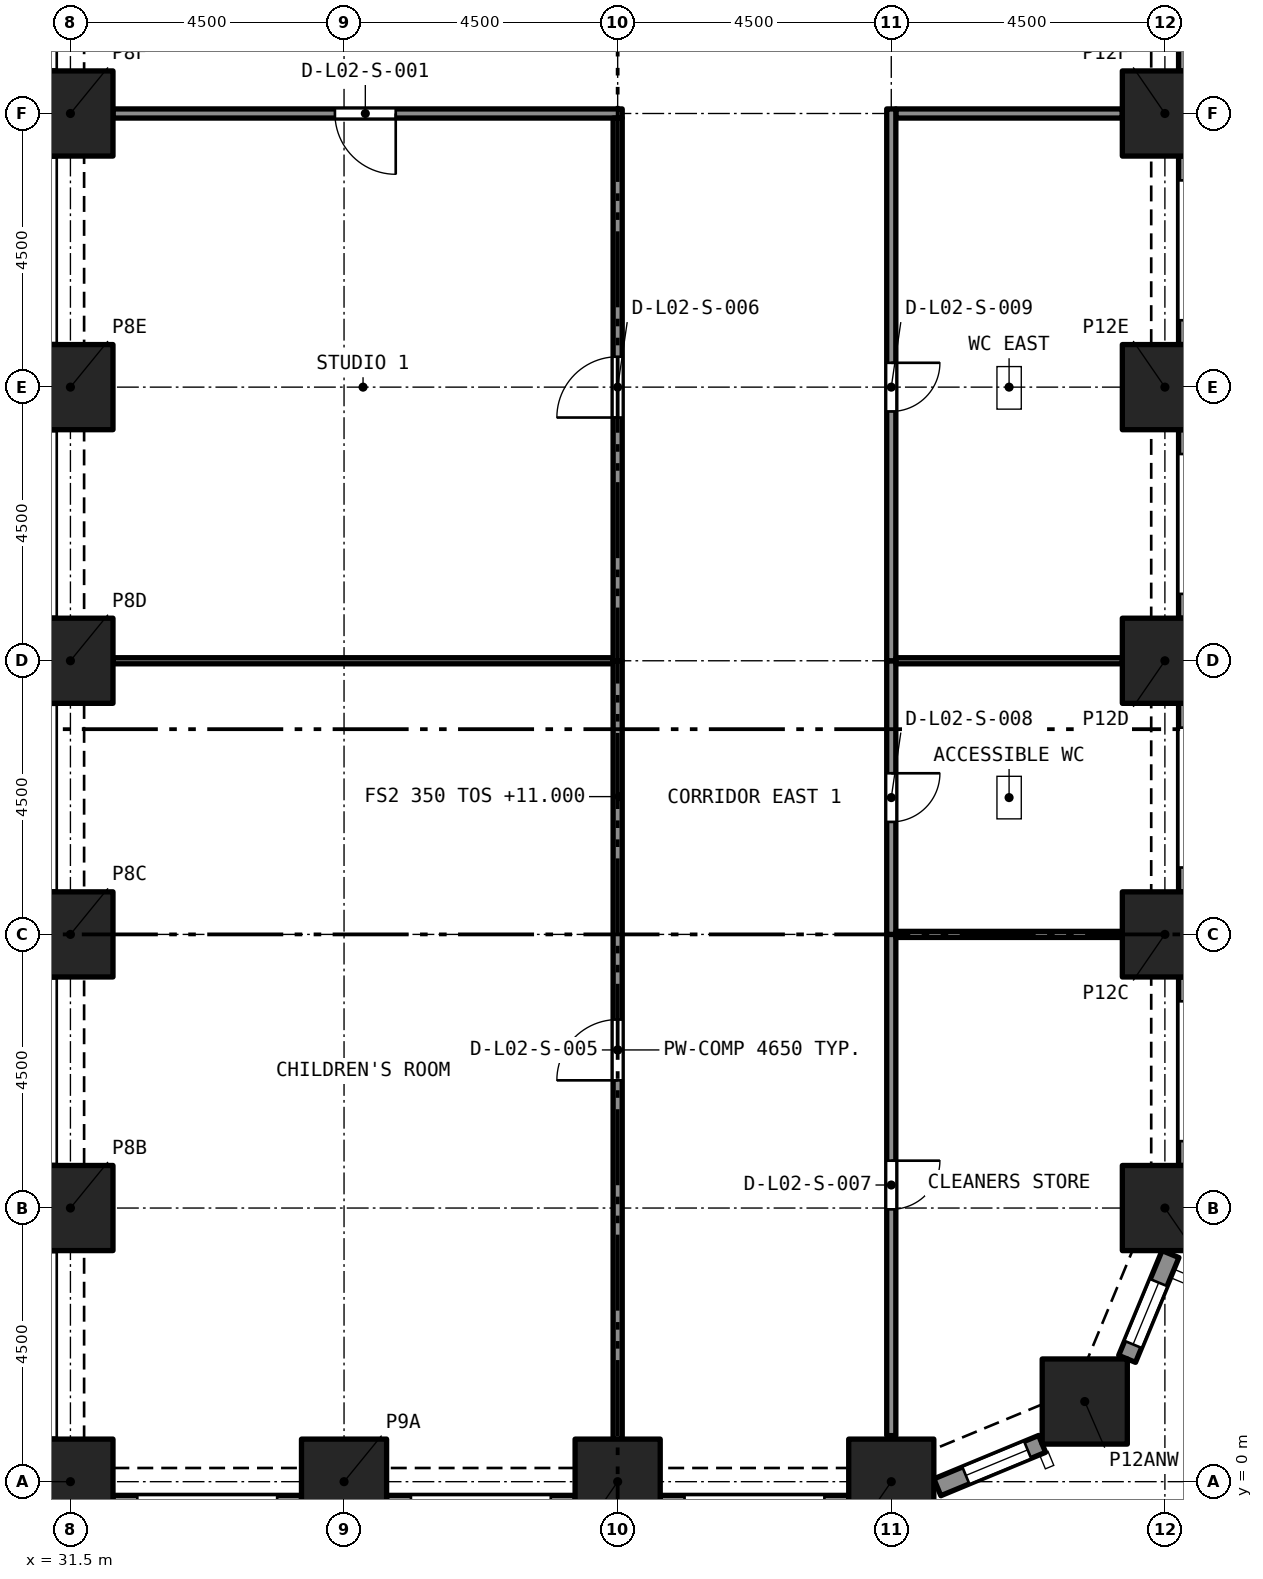
"""IFC4 building model, lengths in metres.
Left out: names, types, materials, properties, quantities, classifications, styles, units other than length and angle.
Written with IfcOpenShell. Run it as: python <this file> out.ifc"""

import sys

from ifc_helpers import new_model, si_unit, direction, frame, frame_2d, origin, origin_2d, place, context, subcontext, project, spatial, rectangle, extrude, element, fill, save


model = new_model("IFC4")
c1 = context("Model", 3, precision=1e-05, world=origin(), true_north=direction((0.0, 1.0)))
c2 = subcontext(c1, "Body", "Model", "MODEL_VIEW")
j1 = project(units=[si_unit("LENGTHUNIT", "METRE"), si_unit("PLANEANGLEUNIT", "RADIAN")], contexts=[c1])
p1 = place(None, origin())
s1 = spatial("IfcSite", under=j1, at=p1, CompositionType="ELEMENT")
p2 = place(p1, origin())
s2 = spatial("IfcBuilding", under=s1, at=p2, CompositionType="ELEMENT")
p3 = place(p2, frame((0.0, 0.0, 11.0)))
s3 = spatial("IfcBuildingStorey", under=s2, at=p3, CompositionType="ELEMENT", Elevation=11.0)
for number, where, z_axis, x_axis in (
    (1, (31.5, 0.0, 0.0), (0.0, 0.0, 1.0), (1.0, 0.0, 0.0)),
    (2, (36.0, 0.0, 0.0), (0.0, 0.0, 1.0), (1.0, 0.0, 0.0)),
    (3, (40.5, 0.0, 0.0), (0.0, 0.0, 1.0), (1.0, 0.0, 0.0)),
    (4, (45.0, 0.0, 0.0), (0.0, 0.0, 1.0), (1.0, 0.0, 0.0)),
    (5, (48.182, 1.318, 0.0), (0.0, 0.0, 1.0), (1.0, 0.0, 0.0)),
    (6, (31.5, 4.5, 0.0), (0.0, 0.0, 1.0), (1.0, 0.0, 0.0)),
    (7, (49.5, 4.5, 0.0), (0.0, 0.0, 1.0), (1.0, 0.0, 0.0)),
    (8, (31.5, 9.0, 0.0), (0.0, 0.0, 1.0), (1.0, 0.0, 0.0)),
    (9, (49.5, 9.0, 0.0), (0.0, 0.0, 1.0), (1.0, 0.0, 0.0)),
    (10, (31.5, 13.5, 0.0), (0.0, 0.0, 1.0), (1.0, 0.0, 0.0)),
    (11, (49.5, 13.5, 0.0), (0.0, 0.0, 1.0), (1.0, 0.0, 0.0)),
    (12, (31.5, 18.0, 0.0), (0.0, 0.0, 1.0), (1.0, 0.0, 0.0)),
    (13, (49.5, 18.0, 0.0), (0.0, 0.0, 1.0), (1.0, 0.0, 0.0)),
    (14, (31.5, 22.5, 0.0), (0.0, 0.0, 1.0), (1.0, 0.0, 0.0)),
    (15, (49.5, 22.5, 0.0), (0.0, 0.0, 1.0), (1.0, 0.0, 0.0)),
):
    element("IfcColumn", number, at=place(p3, frame(where, z_axis=z_axis, x_axis=x_axis)), inside=s3, PredefinedType="COLUMN", context=c2, shape_type="SweptSolid", body=[
        extrude(rectangle(XDim=1.4, YDim=1.4, at=origin_2d()), origin(), (0.0, 0.0, 1.0), 5.0),
    ])
p4 = place(p3, frame((35.3, -0.375, 0.0), z_axis=(0.0, 0.0, 1.0), x_axis=(-1.0, 0.0, 0.0)))
e16 = element("IfcWall", 16, at=p4, inside=s3, PredefinedType="SOLIDWALL", context=c2, shape_type="SweptSolid", body=[
    extrude(rectangle(XDim=3.1, YDim=0.3, at=frame_2d((1.55, 0.0))), origin(), (0.0, 0.0, 1.0), 5.0),
])
p5 = place(p4, frame((0.4, 0.0, 0.45)))
e17 = element("IfcOpeningElement", 17, at=p5, cuts=e16, PredefinedType="OPENING", context=c2, shape_type="SweptSolid", body=[
    extrude(rectangle(XDim=2.3, YDim=3.3, at=frame_2d((1.15, 1.65))), frame((0.0, 0.16, 0.0), z_axis=(0.0, -1.0, 0.0), x_axis=(1.0, 0.0, 0.0)), (0.0, 0.0, 1.0), 0.32),
])
p6 = place(p3, frame((39.8, -0.375, 0.0), z_axis=(0.0, 0.0, 1.0), x_axis=(-1.0, 0.0, 0.0)))
e18 = element("IfcWall", 18, at=p6, inside=s3, PredefinedType="SOLIDWALL", context=c2, shape_type="SweptSolid", body=[
    extrude(rectangle(XDim=3.1, YDim=0.3, at=frame_2d((1.55, 0.0))), origin(), (0.0, 0.0, 1.0), 5.0),
])
p7 = place(p6, frame((0.4, 0.0, 0.45)))
e19 = element("IfcOpeningElement", 19, at=p7, cuts=e18, PredefinedType="OPENING", context=c2, shape_type="SweptSolid", body=[
    extrude(rectangle(XDim=2.3, YDim=3.3, at=frame_2d((1.15, 1.65))), frame((0.0, 0.16, 0.0), z_axis=(0.0, -1.0, 0.0), x_axis=(1.0, 0.0, 0.0)), (0.0, 0.0, 1.0), 0.32),
])
p8 = place(p3, frame((44.3, -0.375, 0.0), z_axis=(0.0, 0.0, 1.0), x_axis=(-1.0, 0.0, 0.0)))
e20 = element("IfcWall", 20, at=p8, inside=s3, PredefinedType="SOLIDWALL", context=c2, shape_type="SweptSolid", body=[
    extrude(rectangle(XDim=3.1, YDim=0.3, at=frame_2d((1.55, 0.0))), origin(), (0.0, 0.0, 1.0), 5.0),
])
p9 = place(p8, frame((0.4, 0.0, 0.45)))
e21 = element("IfcOpeningElement", 21, at=p9, cuts=e20, PredefinedType="OPENING", context=c2, shape_type="SweptSolid", body=[
    extrude(rectangle(XDim=2.3, YDim=3.3, at=frame_2d((1.15, 1.65))), frame((0.0, 0.16, 0.0), z_axis=(0.0, -1.0, 0.0), x_axis=(1.0, 0.0, 0.0)), (0.0, 0.0, 1.0), 0.32),
])
p10 = place(p3, frame((47.48, 0.622, 0.0), z_axis=(0.0, 0.0, 1.0), x_axis=(-0.923903565336, -0.38262540684, 0.0)))
e22 = element("IfcWall", 22, at=p10, inside=s3, PredefinedType="SOLIDWALL", context=c2, shape_type="SweptSolid", body=[
    extrude(rectangle(XDim=1.865, YDim=0.3, at=frame_2d((0.933, 0.0))), origin(), (0.0, 0.0, 1.0), 5.0),
])
p11 = place(p10, frame((0.258, 0.0, 0.45)))
e23 = element("IfcOpeningElement", 23, at=p11, cuts=e22, PredefinedType="OPENING", context=c2, shape_type="SweptSolid", body=[
    extrude(rectangle(XDim=1.1, YDim=3.3, at=frame_2d((0.55, 1.65))), frame((0.0, 0.16, 0.0), z_axis=(0.0, -1.0, 0.0), x_axis=(1.0, 0.0, 0.0)), (0.0, 0.0, 1.0), 0.32),
])
p12 = place(p3, frame((49.592, 3.743, 0.0), z_axis=(0.0, 0.0, 1.0), x_axis=(-0.382737135771, -0.923857286003, 0.0)))
e24 = element("IfcWall", 24, at=p12, inside=s3, PredefinedType="SOLIDWALL", context=c2, shape_type="SweptSolid", body=[
    extrude(rectangle(XDim=1.865, YDim=0.3, at=frame_2d((0.933, 0.0))), origin(), (0.0, 0.0, 1.0), 5.0),
])
p13 = place(p12, frame((0.508, 0.0, 0.45)))
e25 = element("IfcOpeningElement", 25, at=p13, cuts=e24, PredefinedType="OPENING", context=c2, shape_type="SweptSolid", body=[
    extrude(rectangle(XDim=1.1, YDim=3.3, at=frame_2d((0.55, 1.65))), frame((0.0, 0.16, 0.0), z_axis=(0.0, -1.0, 0.0), x_axis=(1.0, 0.0, 0.0)), (0.0, 0.0, 1.0), 0.32),
])
p14 = place(p3, frame((49.875, 8.3, 0.0), z_axis=(0.0, 0.0, 1.0), x_axis=(0.0, -1.0, 0.0)))
e26 = element("IfcWall", 26, at=p14, inside=s3, PredefinedType="SOLIDWALL", context=c2, shape_type="SweptSolid", body=[
    extrude(rectangle(XDim=3.1, YDim=0.3, at=frame_2d((1.55, 0.0))), origin(), (0.0, 0.0, 1.0), 5.0),
])
p15 = place(p14, frame((0.4, 0.0, 0.45)))
e27 = element("IfcOpeningElement", 27, at=p15, cuts=e26, PredefinedType="OPENING", context=c2, shape_type="SweptSolid", body=[
    extrude(rectangle(XDim=2.3, YDim=3.3, at=frame_2d((1.15, 1.65))), frame((0.0, 0.16, 0.0), z_axis=(0.0, -1.0, 0.0), x_axis=(1.0, 0.0, 0.0)), (0.0, 0.0, 1.0), 0.32),
])
p16 = place(p3, frame((49.875, 12.8, 0.0), z_axis=(0.0, 0.0, 1.0), x_axis=(0.0, -1.0, 0.0)))
e28 = element("IfcWall", 28, at=p16, inside=s3, PredefinedType="SOLIDWALL", context=c2, shape_type="SweptSolid", body=[
    extrude(rectangle(XDim=3.1, YDim=0.3, at=frame_2d((1.55, 0.0))), origin(), (0.0, 0.0, 1.0), 5.0),
])
p17 = place(p16, frame((0.4, 0.0, 0.45)))
e29 = element("IfcOpeningElement", 29, at=p17, cuts=e28, PredefinedType="OPENING", context=c2, shape_type="SweptSolid", body=[
    extrude(rectangle(XDim=2.3, YDim=3.3, at=frame_2d((1.15, 1.65))), frame((0.0, 0.16, 0.0), z_axis=(0.0, -1.0, 0.0), x_axis=(1.0, 0.0, 0.0)), (0.0, 0.0, 1.0), 0.32),
])
p18 = place(p3, frame((49.875, 17.3, 0.0), z_axis=(0.0, 0.0, 1.0), x_axis=(0.0, -1.0, 0.0)))
e30 = element("IfcWall", 30, at=p18, inside=s3, PredefinedType="SOLIDWALL", context=c2, shape_type="SweptSolid", body=[
    extrude(rectangle(XDim=3.1, YDim=0.3, at=frame_2d((1.55, 0.0))), origin(), (0.0, 0.0, 1.0), 5.0),
])
p19 = place(p18, frame((0.4, 0.0, 0.45)))
e31 = element("IfcOpeningElement", 31, at=p19, cuts=e30, PredefinedType="OPENING", context=c2, shape_type="SweptSolid", body=[
    extrude(rectangle(XDim=2.3, YDim=3.3, at=frame_2d((1.15, 1.65))), frame((0.0, 0.16, 0.0), z_axis=(0.0, -1.0, 0.0), x_axis=(1.0, 0.0, 0.0)), (0.0, 0.0, 1.0), 0.32),
])
p20 = place(p3, frame((49.875, 21.8, 0.0), z_axis=(0.0, 0.0, 1.0), x_axis=(0.0, -1.0, 0.0)))
e32 = element("IfcWall", 32, at=p20, inside=s3, PredefinedType="SOLIDWALL", context=c2, shape_type="SweptSolid", body=[
    extrude(rectangle(XDim=3.1, YDim=0.3, at=frame_2d((1.55, 0.0))), origin(), (0.0, 0.0, 1.0), 5.0),
])
p21 = place(p20, frame((0.4, 0.0, 0.45)))
e33 = element("IfcOpeningElement", 33, at=p21, cuts=e32, PredefinedType="OPENING", context=c2, shape_type="SweptSolid", body=[
    extrude(rectangle(XDim=2.3, YDim=3.3, at=frame_2d((1.15, 1.65))), frame((0.0, 0.16, 0.0), z_axis=(0.0, -1.0, 0.0), x_axis=(1.0, 0.0, 0.0)), (0.0, 0.0, 1.0), 0.32),
])
p22 = place(p3, frame((49.875, 26.3, 0.0), z_axis=(0.0, 0.0, 1.0), x_axis=(0.0, -1.0, 0.0)))
e34 = element("IfcWall", 34, at=p22, inside=s3, PredefinedType="SOLIDWALL", context=c2, shape_type="SweptSolid", body=[
    extrude(rectangle(XDim=3.1, YDim=0.3, at=frame_2d((1.55, 0.0))), origin(), (0.0, 0.0, 1.0), 5.0),
])
p23 = place(p22, frame((0.4, 0.0, 0.45)))
e35 = element("IfcOpeningElement", 35, at=p23, cuts=e34, PredefinedType="OPENING", context=c2, shape_type="SweptSolid", body=[
    extrude(rectangle(XDim=2.3, YDim=3.3, at=frame_2d((1.15, 1.65))), frame((0.0, 0.16, 0.0), z_axis=(0.0, -1.0, 0.0), x_axis=(1.0, 0.0, 0.0)), (0.0, 0.0, 1.0), 0.32),
])
p24 = place(p3, frame((40.575, 22.5, 0.0), z_axis=(0.0, 0.0, 1.0), x_axis=(-1.0, 0.0, 0.0)))
e36 = element("IfcWall", 36, at=p24, inside=s3, PredefinedType="PARTITIONING", context=c2, shape_type="SweptSolid", body=[
    extrude(rectangle(XDim=8.375, YDim=0.15, at=frame_2d((4.188, 0.0))), origin(), (0.0, 0.0, 1.0), 4.65),
])
p25 = place(p24, frame((3.725, 0.0, 0.0)))
e37 = element("IfcOpeningElement", 37, at=p25, cuts=e36, PredefinedType="OPENING", context=c2, shape_type="SweptSolid", body=[
    extrude(rectangle(XDim=1.0, YDim=2.1, at=frame_2d((0.5, 1.05))), frame((0.0, 0.085, 0.0), z_axis=(0.0, -1.0, 0.0), x_axis=(1.0, 0.0, 0.0)), (0.0, 0.0, 1.0), 0.17),
])
p26 = place(p3, frame((45.075, 22.5, 0.0), z_axis=(0.0, 0.0, 1.0), x_axis=(1.0, 0.0, 0.0)))
e38 = element("IfcWall", 38, at=p26, inside=s3, PredefinedType="PARTITIONING", context=c2, shape_type="SweptSolid", body=[
    extrude(rectangle(XDim=3.725, YDim=0.15, at=frame_2d((1.863, 0.0))), origin(), (0.0, 0.0, 1.0), 4.65),
])
p27 = place(p3, frame((32.2, 13.5, 0.0), z_axis=(0.0, 0.0, 1.0), x_axis=(1.0, 0.0, 0.0)))
e39 = element("IfcWall", 39, at=p27, inside=s3, PredefinedType="PARTITIONING", context=c2, shape_type="SweptSolid", body=[
    extrude(rectangle(XDim=8.225, YDim=0.1, at=frame_2d((4.113, 0.0))), origin(), (0.0, 0.0, 1.0), 4.65),
])
p28 = place(p3, frame((40.5, 0.7, 0.0), z_axis=(0.0, 0.0, 1.0), x_axis=(0.0, 1.0, 0.0)))
e40 = element("IfcWall", 40, at=p28, inside=s3, PredefinedType="PARTITIONING", context=c2, shape_type="SweptSolid", body=[
    extrude(rectangle(XDim=12.8, YDim=0.15, at=frame_2d((6.4, 0.0))), origin(), (0.0, 0.0, 1.0), 4.65),
])
p29 = place(p28, frame((5.9, 0.0, 0.0)))
e41 = element("IfcOpeningElement", 41, at=p29, cuts=e40, PredefinedType="OPENING", context=c2, shape_type="SweptSolid", body=[
    extrude(rectangle(XDim=1.0, YDim=2.1, at=frame_2d((0.5, 1.05))), frame((0.0, 0.085, 0.0), z_axis=(0.0, -1.0, 0.0), x_axis=(1.0, 0.0, 0.0)), (0.0, 0.0, 1.0), 0.17),
])
p30 = place(p3, frame((40.5, 13.5, 0.0), z_axis=(0.0, 0.0, 1.0), x_axis=(0.0, 1.0, 0.0)))
e42 = element("IfcWall", 42, at=p30, inside=s3, PredefinedType="PARTITIONING", context=c2, shape_type="SweptSolid", body=[
    extrude(rectangle(XDim=8.925, YDim=0.15, at=frame_2d((4.462, 0.0))), origin(), (0.0, 0.0, 1.0), 4.65),
])
p31 = place(p30, frame((4.0, 0.0, 0.0)))
e43 = element("IfcOpeningElement", 43, at=p31, cuts=e42, PredefinedType="OPENING", context=c2, shape_type="SweptSolid", body=[
    extrude(rectangle(XDim=1.0, YDim=2.1, at=frame_2d((0.5, 1.05))), frame((0.0, 0.085, 0.0), z_axis=(0.0, -1.0, 0.0), x_axis=(1.0, 0.0, 0.0)), (0.0, 0.0, 1.0), 0.17),
])
p32 = place(p3, frame((45.0, 9.0, 0.0), z_axis=(0.0, 0.0, 1.0), x_axis=(0.0, -1.0, 0.0)))
e44 = element("IfcWall", 44, at=p32, inside=s3, PredefinedType="PARTITIONING", context=c2, shape_type="SweptSolid", body=[
    extrude(rectangle(XDim=8.242, YDim=0.15, at=frame_2d((4.121, 0.0))), origin(), (0.0, 0.0, 1.0), 4.65),
])
p33 = place(p32, frame((3.721, 0.0, 0.0)))
e45 = element("IfcOpeningElement", 45, at=p33, cuts=e44, PredefinedType="OPENING", context=c2, shape_type="SweptSolid", body=[
    extrude(rectangle(XDim=0.8, YDim=2.1, at=frame_2d((0.4, 1.05))), frame((0.0, 0.085, 0.0), z_axis=(0.0, -1.0, 0.0), x_axis=(1.0, 0.0, 0.0)), (0.0, 0.0, 1.0), 0.17),
])
p34 = place(p3, frame((45.0, 13.5, 0.0), z_axis=(0.0, 0.0, 1.0), x_axis=(0.0, -1.0, 0.0)))
e46 = element("IfcWall", 46, at=p34, inside=s3, PredefinedType="PARTITIONING", context=c2, shape_type="SweptSolid", body=[
    extrude(rectangle(XDim=4.5, YDim=0.15, at=frame_2d((2.25, 0.0))), origin(), (0.0, 0.0, 1.0), 4.65),
])
p35 = place(p34, frame((1.85, 0.0, 0.0)))
e47 = element("IfcOpeningElement", 47, at=p35, cuts=e46, PredefinedType="OPENING", context=c2, shape_type="SweptSolid", body=[
    extrude(rectangle(XDim=0.8, YDim=2.1, at=frame_2d((0.4, 1.05))), frame((0.0, 0.085, 0.0), z_axis=(0.0, -1.0, 0.0), x_axis=(1.0, 0.0, 0.0)), (0.0, 0.0, 1.0), 0.17),
])
p36 = place(p3, frame((45.0, 22.575, 0.0), z_axis=(0.0, 0.0, 1.0), x_axis=(0.0, -1.0, 0.0)))
e48 = element("IfcWall", 48, at=p36, inside=s3, PredefinedType="PARTITIONING", context=c2, shape_type="SweptSolid", body=[
    extrude(rectangle(XDim=9.075, YDim=0.15, at=frame_2d((4.538, 0.0))), origin(), (0.0, 0.0, 1.0), 4.65),
])
p37 = place(p36, frame((4.175, 0.0, 0.0)))
e49 = element("IfcOpeningElement", 49, at=p37, cuts=e48, PredefinedType="OPENING", context=c2, shape_type="SweptSolid", body=[
    extrude(rectangle(XDim=0.8, YDim=2.1, at=frame_2d((0.4, 1.05))), frame((0.0, 0.085, 0.0), z_axis=(0.0, -1.0, 0.0), x_axis=(1.0, 0.0, 0.0)), (0.0, 0.0, 1.0), 0.17),
])
for number, where, z_axis, x_axis in (
    (50, (45.075, 9.0, 0.0), (0.0, 0.0, 1.0), (1.0, 0.0, 0.0)),
    (51, (45.075, 13.5, 0.0), (0.0, 0.0, 1.0), (1.0, 0.0, 0.0)),
):
    element("IfcWall", number, at=place(p3, frame(where, z_axis=z_axis, x_axis=x_axis)), inside=s3, PredefinedType="PARTITIONING", context=c2, shape_type="SweptSolid", body=[
        extrude(rectangle(XDim=3.725, YDim=0.1, at=frame_2d((1.863, 0.0))), origin(), (0.0, 0.0, 1.0), 4.65),
    ])
p38 = place(p11, origin())
e52 = element("IfcWindow", 52, at=p38, inside=s3, PartitioningType="SINGLE_PANEL", PredefinedType="WINDOW", context=c2, shape_type="SweptSolid", body=[
    extrude(rectangle(XDim=1.1, YDim=3.3, at=frame_2d((0.55, 1.65))), frame((0.0, 0.03, 0.0), z_axis=(0.0, -1.0, 0.0), x_axis=(1.0, 0.0, 0.0)), (0.0, 0.0, 1.0), 0.06),
])
fill(e23, e52)
p39 = place(p13, origin())
e53 = element("IfcWindow", 53, at=p39, inside=s3, PartitioningType="SINGLE_PANEL", PredefinedType="WINDOW", context=c2, shape_type="SweptSolid", body=[
    extrude(rectangle(XDim=1.1, YDim=3.3, at=frame_2d((0.55, 1.65))), frame((0.0, 0.03, 0.0), z_axis=(0.0, -1.0, 0.0), x_axis=(1.0, 0.0, 0.0)), (0.0, 0.0, 1.0), 0.06),
])
fill(e25, e53)
p40 = place(p25, origin())
e54 = element("IfcDoor", 54, at=p40, inside=s3, OperationType="SINGLE_SWING_RIGHT", PredefinedType="DOOR", context=c2, shape_type="SweptSolid", body=[
    extrude(rectangle(XDim=1.0, YDim=2.1, at=frame_2d((0.5, 1.05))), frame((0.0, 0.025, 0.0), z_axis=(0.0, -1.0, 0.0), x_axis=(1.0, 0.0, 0.0)), (0.0, 0.0, 1.0), 0.05),
])
fill(e37, e54)
p41 = place(p29, origin())
e55 = element("IfcDoor", 55, at=p41, inside=s3, OperationType="SINGLE_SWING_RIGHT", PredefinedType="DOOR", context=c2, shape_type="SweptSolid", body=[
    extrude(rectangle(XDim=1.0, YDim=2.1, at=frame_2d((0.5, 1.05))), frame((0.0, 0.025, 0.0), z_axis=(0.0, -1.0, 0.0), x_axis=(1.0, 0.0, 0.0)), (0.0, 0.0, 1.0), 0.05),
])
fill(e41, e55)
p42 = place(p31, origin())
e56 = element("IfcDoor", 56, at=p42, inside=s3, OperationType="SINGLE_SWING_RIGHT", PredefinedType="DOOR", context=c2, shape_type="SweptSolid", body=[
    extrude(rectangle(XDim=1.0, YDim=2.1, at=frame_2d((0.5, 1.05))), frame((0.0, 0.025, 0.0), z_axis=(0.0, -1.0, 0.0), x_axis=(1.0, 0.0, 0.0)), (0.0, 0.0, 1.0), 0.05),
])
fill(e43, e56)
p43 = place(p33, origin())
e57 = element("IfcDoor", 57, at=p43, inside=s3, OperationType="SINGLE_SWING_RIGHT", PredefinedType="DOOR", context=c2, shape_type="SweptSolid", body=[
    extrude(rectangle(XDim=0.8, YDim=2.1, at=frame_2d((0.4, 1.05))), frame((0.0, 0.025, 0.0), z_axis=(0.0, -1.0, 0.0), x_axis=(1.0, 0.0, 0.0)), (0.0, 0.0, 1.0), 0.05),
])
fill(e45, e57)
p44 = place(p35, origin())
e58 = element("IfcDoor", 58, at=p44, inside=s3, OperationType="SINGLE_SWING_RIGHT", PredefinedType="DOOR", context=c2, shape_type="SweptSolid", body=[
    extrude(rectangle(XDim=0.8, YDim=2.1, at=frame_2d((0.4, 1.05))), frame((0.0, 0.025, 0.0), z_axis=(0.0, -1.0, 0.0), x_axis=(1.0, 0.0, 0.0)), (0.0, 0.0, 1.0), 0.05),
])
fill(e47, e58)
p45 = place(p37, origin())
e59 = element("IfcDoor", 59, at=p45, inside=s3, OperationType="SINGLE_SWING_RIGHT", PredefinedType="DOOR", context=c2, shape_type="SweptSolid", body=[
    extrude(rectangle(XDim=0.8, YDim=2.1, at=frame_2d((0.4, 1.05))), frame((0.0, 0.025, 0.0), z_axis=(0.0, -1.0, 0.0), x_axis=(1.0, 0.0, 0.0)), (0.0, 0.0, 1.0), 0.05),
])
fill(e49, e59)
save(model, sys.argv[1])
